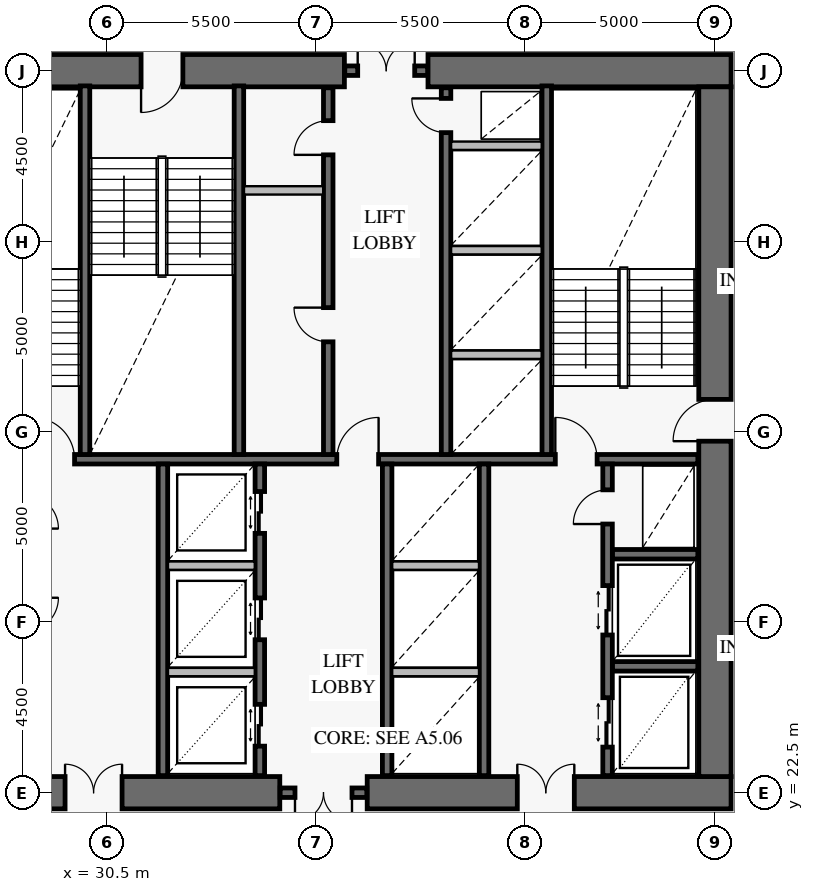
"""IFC4 building model, lengths in metres.
Left out: names, types, materials, properties, quantities, classifications, styles, units other than length and angle.
Written with IfcOpenShell. Run it as: python <this file> out.ifc"""

import sys

from ifc_helpers import new_model, si_unit, direction, frame, frame_2d, origin, place, context, subcontext, project, spatial, rectangle, extrude, element, fill, save


model = new_model("IFC4")
c1 = context("Model", 3, precision=1e-05, world=origin(), true_north=direction((0.0, 1.0)))
c2 = subcontext(c1, "Body", "Model", "MODEL_VIEW")
j1 = project(units=[si_unit("LENGTHUNIT", "METRE"), si_unit("PLANEANGLEUNIT", "RADIAN")], contexts=[c1])
p1 = place(None, origin())
s1 = spatial("IfcSite", under=j1, at=p1, CompositionType="ELEMENT")
p2 = place(p1, origin())
s2 = spatial("IfcBuilding", under=s1, at=p2, CompositionType="ELEMENT")
p3 = place(p2, frame((0.0, 0.0, 28.8)))
s3 = spatial("IfcBuildingStorey", under=s2, at=p3, CompositionType="ELEMENT", Elevation=28.8)
p4 = place(p3, frame((25.075, 22.5, 0.0), z_axis=(0.0, 0.0, 1.0), x_axis=(1.0, 0.0, 0.0)))
e1 = element("IfcWall", 1, at=p4, inside=s3, PredefinedType="SHEAR", context=c2, shape_type="SweptSolid", body=[
    extrude(rectangle(XDim=9.975, YDim=0.85, at=frame_2d((4.988, 0.0))), origin(), (0.0, 0.0, 1.0), 4.2),
])
p5 = place(p4, frame((4.325, 0.0, 0.0)))
e2 = element("IfcOpeningElement", 2, at=p5, cuts=e1, PredefinedType="OPENING", context=c2, shape_type="SweptSolid", body=[
    extrude(rectangle(XDim=1.5, YDim=2.15, at=frame_2d((0.75, 1.075))), frame((0.0, 0.437, 0.0), z_axis=(0.0, -1.0, 0.0), x_axis=(1.0, 0.0, 0.0)), (0.0, 0.0, 1.0), 0.874),
])
p6 = place(p3, frame((37.35, 22.5, 0.0), z_axis=(0.0, 0.0, 1.0), x_axis=(1.0, 0.0, 0.0)))
e3 = element("IfcWall", 3, at=p6, inside=s3, PredefinedType="SHEAR", context=c2, shape_type="SweptSolid", body=[
    extrude(rectangle(XDim=9.575, YDim=0.85, at=frame_2d((4.788, 0.0))), origin(), (0.0, 0.0, 1.0), 4.2),
])
p7 = place(p6, frame((3.95, 0.0, 0.0)))
e4 = element("IfcOpeningElement", 4, at=p7, cuts=e3, PredefinedType="OPENING", context=c2, shape_type="SweptSolid", body=[
    extrude(rectangle(XDim=1.5, YDim=2.15, at=frame_2d((0.75, 1.075))), frame((0.0, 0.437, 0.0), z_axis=(0.0, -1.0, 0.0), x_axis=(1.0, 0.0, 0.0)), (0.0, 0.0, 1.0), 0.874),
])
p8 = place(p3, frame((46.925, 41.5, 0.0), z_axis=(0.0, 0.0, 1.0), x_axis=(-1.0, 0.0, 0.0)))
e5 = element("IfcWall", 5, at=p8, inside=s3, PredefinedType="SHEAR", context=c2, shape_type="SweptSolid", body=[
    extrude(rectangle(XDim=7.975, YDim=0.85, at=frame_2d((3.988, 0.0))), origin(), (0.0, 0.0, 1.0), 4.2),
])
p9 = place(p3, frame((36.75, 41.5, 0.0), z_axis=(0.0, 0.0, 1.0), x_axis=(-1.0, 0.0, 0.0)))
e6 = element("IfcWall", 6, at=p9, inside=s3, PredefinedType="SHEAR", context=c2, shape_type="SweptSolid", body=[
    extrude(rectangle(XDim=11.675, YDim=0.85, at=frame_2d((5.837, 0.0))), origin(), (0.0, 0.0, 1.0), 4.2),
])
p10 = place(p9, frame((4.25, 0.0, 0.0)))
e7 = element("IfcOpeningElement", 7, at=p10, cuts=e6, PredefinedType="OPENING", context=c2, shape_type="SweptSolid", body=[
    extrude(rectangle(XDim=1.1, YDim=2.15, at=frame_2d((0.55, 1.075))), frame((0.0, 0.437, 0.0), z_axis=(0.0, -1.0, 0.0), x_axis=(1.0, 0.0, 0.0)), (0.0, 0.0, 1.0), 0.874),
])
p11 = place(p3, frame((46.5, 22.925, 0.0), z_axis=(0.0, 0.0, 1.0), x_axis=(0.0, 1.0, 0.0)))
e8 = element("IfcWall", 8, at=p11, inside=s3, PredefinedType="SHEAR", context=c2, shape_type="SweptSolid", body=[
    extrude(rectangle(XDim=18.15, YDim=0.85, at=frame_2d((9.075, 0.0))), origin(), (0.0, 0.0, 1.0), 4.2),
])
p12 = place(p11, frame((8.825, 0.0, 0.0)))
e9 = element("IfcOpeningElement", 9, at=p12, cuts=e8, PredefinedType="OPENING", context=c2, shape_type="SweptSolid", body=[
    extrude(rectangle(XDim=1.1, YDim=2.15, at=frame_2d((0.55, 1.075))), frame((0.0, 0.437, 0.0), z_axis=(0.0, -1.0, 0.0), x_axis=(1.0, 0.0, 0.0)), (0.0, 0.0, 1.0), 0.874),
])
p13 = place(p3, frame((35.06, 22.5, 0.0), z_axis=(0.0, 0.0, 1.0), x_axis=(1.0, 0.0, 0.0)))
e10 = element("IfcWall", 10, at=p13, inside=s3, PredefinedType="SOLIDWALL", context=c2, shape_type="SweptSolid", body=[
    extrude(rectangle(XDim=2.28, YDim=0.25, at=frame_2d((1.14, 0.0))), origin(), (0.0, 0.0, 1.0), 4.2),
])
p14 = place(p13, frame((0.39, 0.0, 0.0)))
e11 = element("IfcOpeningElement", 11, at=p14, cuts=e10, PredefinedType="OPENING", context=c2, shape_type="SweptSolid", body=[
    extrude(rectangle(XDim=1.5, YDim=2.15, at=frame_2d((0.75, 1.075))), frame((0.0, 0.137, 0.0), z_axis=(0.0, -1.0, 0.0), x_axis=(1.0, 0.0, 0.0)), (0.0, 0.0, 1.0), 0.274),
])
p15 = place(p3, frame((36.76, 41.5, 0.0), z_axis=(0.0, 0.0, 1.0), x_axis=(1.0, 0.0, 0.0)))
e12 = element("IfcWall", 12, at=p15, inside=s3, PredefinedType="SOLIDWALL", context=c2, shape_type="SweptSolid", body=[
    extrude(rectangle(XDim=2.18, YDim=0.25, at=frame_2d((1.09, 0.0))), origin(), (0.0, 0.0, 1.0), 4.2),
])
p16 = place(p15, frame((0.34, 0.0, 0.0)))
e13 = element("IfcOpeningElement", 13, at=p16, cuts=e12, PredefinedType="OPENING", context=c2, shape_type="SweptSolid", body=[
    extrude(rectangle(XDim=1.5, YDim=2.15, at=frame_2d((0.75, 1.075))), frame((0.0, 0.137, 0.0), z_axis=(0.0, -1.0, 0.0), x_axis=(1.0, 0.0, 0.0)), (0.0, 0.0, 1.0), 0.274),
])
p17 = place(p3, frame((25.95, 31.275, 0.0), z_axis=(0.0, 0.0, 1.0), x_axis=(1.0, 0.0, 0.0)))
e14 = element("IfcWall", 14, at=p17, inside=s3, PredefinedType="SOLIDWALL", context=c2, shape_type="SweptSolid", body=[
    extrude(rectangle(XDim=20.1, YDim=0.25, at=frame_2d((10.05, 0.0))), origin(), (0.0, 0.0, 1.0), 4.2),
])
p18 = place(p17, frame((2.6, 0.0, 0.0)))
e15 = element("IfcOpeningElement", 15, at=p18, cuts=e14, PredefinedType="OPENING", context=c2, shape_type="SweptSolid", body=[
    extrude(rectangle(XDim=1.1, YDim=2.15, at=frame_2d((0.55, 1.075))), frame((0.0, 0.137, 0.0), z_axis=(0.0, -1.0, 0.0), x_axis=(1.0, 0.0, 0.0)), (0.0, 0.0, 1.0), 0.274),
])
p19 = place(p17, frame((10.6, 0.0, 0.0)))
e16 = element("IfcOpeningElement", 16, at=p19, cuts=e14, PredefinedType="OPENING", context=c2, shape_type="SweptSolid", body=[
    extrude(rectangle(XDim=1.1, YDim=2.15, at=frame_2d((0.55, 1.075))), frame((0.0, 0.137, 0.0), z_axis=(0.0, -1.0, 0.0), x_axis=(1.0, 0.0, 0.0)), (0.0, 0.0, 1.0), 0.274),
])
p20 = place(p17, frame((16.35, 0.0, 0.0)))
e17 = element("IfcOpeningElement", 17, at=p20, cuts=e14, PredefinedType="OPENING", context=c2, shape_type="SweptSolid", body=[
    extrude(rectangle(XDim=1.1, YDim=2.15, at=frame_2d((0.55, 1.075))), frame((0.0, 0.137, 0.0), z_axis=(0.0, -1.0, 0.0), x_axis=(1.0, 0.0, 0.0)), (0.0, 0.0, 1.0), 0.274),
])
for number, where, z_axis, x_axis in (
    (18, (29.925, 31.4, 0.0), (0.0, 0.0, 1.0), (0.0, 1.0, 0.0)),
    (19, (33.975, 31.4, 0.0), (0.0, 0.0, 1.0), (0.0, 1.0, 0.0)),
    (20, (42.075, 31.4, 0.0), (0.0, 0.0, 1.0), (0.0, 1.0, 0.0)),
):
    element("IfcWall", number, at=place(p3, frame(where, z_axis=z_axis, x_axis=x_axis)), inside=s3, PredefinedType="SOLIDWALL", context=c2, shape_type="SweptSolid", body=[
        extrude(rectangle(XDim=9.7, YDim=0.25, at=frame_2d((4.85, 0.0))), origin(), (0.0, 0.0, 1.0), 4.2),
    ])
p21 = place(p3, frame((36.325, 31.4, 0.0), z_axis=(0.0, 0.0, 1.0), x_axis=(0.0, 1.0, 0.0)))
e21 = element("IfcWall", 21, at=p21, inside=s3, PredefinedType="SOLIDWALL", context=c2, shape_type="SweptSolid", body=[
    extrude(rectangle(XDim=9.65, YDim=0.25, at=frame_2d((4.825, 0.0))), origin(), (0.0, 0.0, 1.0), 4.2),
])
p22 = place(p21, frame((2.965, 0.0, 0.0)))
e22 = element("IfcOpeningElement", 22, at=p22, cuts=e21, PredefinedType="OPENING", context=c2, shape_type="SweptSolid", body=[
    extrude(rectangle(XDim=0.9, YDim=2.1, at=frame_2d((0.45, 1.05))), frame((0.0, 0.137, 0.0), z_axis=(0.0, -1.0, 0.0), x_axis=(1.0, 0.0, 0.0)), (0.0, 0.0, 1.0), 0.274),
])
p23 = place(p21, frame((7.885, 0.0, 0.0)))
e23 = element("IfcOpeningElement", 23, at=p23, cuts=e21, PredefinedType="OPENING", context=c2, shape_type="SweptSolid", body=[
    extrude(rectangle(XDim=0.9, YDim=2.1, at=frame_2d((0.45, 1.05))), frame((0.0, 0.137, 0.0), z_axis=(0.0, -1.0, 0.0), x_axis=(1.0, 0.0, 0.0)), (0.0, 0.0, 1.0), 0.274),
])
p24 = place(p3, frame((39.425, 31.4, 0.0), z_axis=(0.0, 0.0, 1.0), x_axis=(0.0, 1.0, 0.0)))
e24 = element("IfcWall", 24, at=p24, inside=s3, PredefinedType="SOLIDWALL", context=c2, shape_type="SweptSolid", body=[
    extrude(rectangle(XDim=9.65, YDim=0.25, at=frame_2d((4.825, 0.0))), origin(), (0.0, 0.0, 1.0), 4.2),
])
p25 = place(p24, frame((8.47, 0.0, 0.0)))
e25 = element("IfcOpeningElement", 25, at=p25, cuts=e24, PredefinedType="OPENING", context=c2, shape_type="SweptSolid", body=[
    extrude(rectangle(XDim=0.9, YDim=2.1, at=frame_2d((0.45, 1.05))), frame((0.0, 0.137, 0.0), z_axis=(0.0, -1.0, 0.0), x_axis=(1.0, 0.0, 0.0)), (0.0, 0.0, 1.0), 0.274),
])
p26 = place(p3, frame((31.975, 22.95, 0.0), z_axis=(0.0, 0.0, 1.0), x_axis=(0.0, 1.0, 0.0)))
e26 = element("IfcWall", 26, at=p26, inside=s3, PredefinedType="SOLIDWALL", context=c2, shape_type="SweptSolid", body=[
    extrude(rectangle(XDim=8.2, YDim=0.25, at=frame_2d((4.1, 0.0))), origin(), (0.0, 0.0, 1.0), 4.2),
])
p27 = place(p3, frame((34.525, 22.95, 0.0), z_axis=(0.0, 0.0, 1.0), x_axis=(0.0, 1.0, 0.0)))
e27 = element("IfcWall", 27, at=p27, inside=s3, PredefinedType="SOLIDWALL", context=c2, shape_type="SweptSolid", body=[
    extrude(rectangle(XDim=8.2, YDim=0.25, at=frame_2d((4.1, 0.0))), origin(), (0.0, 0.0, 1.0), 4.2),
])
p28 = place(p27, frame((0.775, 0.0, 0.0)))
e28 = element("IfcOpeningElement", 28, at=p28, cuts=e27, PredefinedType="OPENING", context=c2, shape_type="SweptSolid", body=[
    extrude(rectangle(XDim=1.1, YDim=2.2, at=frame_2d((0.55, 1.1))), frame((0.0, 0.137, 0.0), z_axis=(0.0, -1.0, 0.0), x_axis=(1.0, 0.0, 0.0)), (0.0, 0.0, 1.0), 0.274),
])
p29 = place(p27, frame((3.575, 0.0, 0.0)))
e29 = element("IfcOpeningElement", 29, at=p29, cuts=e27, PredefinedType="OPENING", context=c2, shape_type="SweptSolid", body=[
    extrude(rectangle(XDim=1.1, YDim=2.2, at=frame_2d((0.55, 1.1))), frame((0.0, 0.137, 0.0), z_axis=(0.0, -1.0, 0.0), x_axis=(1.0, 0.0, 0.0)), (0.0, 0.0, 1.0), 0.274),
])
p30 = place(p27, frame((6.375, 0.0, 0.0)))
e30 = element("IfcOpeningElement", 30, at=p30, cuts=e27, PredefinedType="OPENING", context=c2, shape_type="SweptSolid", body=[
    extrude(rectangle(XDim=1.1, YDim=2.2, at=frame_2d((0.55, 1.1))), frame((0.0, 0.137, 0.0), z_axis=(0.0, -1.0, 0.0), x_axis=(1.0, 0.0, 0.0)), (0.0, 0.0, 1.0), 0.274),
])
for number, where, z_axis, x_axis in (
    (31, (37.875, 22.95, 0.0), (0.0, 0.0, 1.0), (0.0, 1.0, 0.0)),
    (32, (40.425, 22.95, 0.0), (0.0, 0.0, 1.0), (0.0, 1.0, 0.0)),
):
    element("IfcWall", number, at=place(p3, frame(where, z_axis=z_axis, x_axis=x_axis)), inside=s3, PredefinedType="SOLIDWALL", context=c2, shape_type="SweptSolid", body=[
        extrude(rectangle(XDim=8.2, YDim=0.25, at=frame_2d((4.1, 0.0))), origin(), (0.0, 0.0, 1.0), 4.2),
    ])
for number, where, z_axis, x_axis in (
    (33, (43.8, 25.825, 0.0), (0.0, 0.0, 1.0), (1.0, 0.0, 0.0)),
    (34, (43.8, 28.775, 0.0), (0.0, 0.0, 1.0), (1.0, 0.0, 0.0)),
):
    element("IfcWall", number, at=place(p3, frame(where, z_axis=z_axis, x_axis=x_axis)), inside=s3, PredefinedType="SOLIDWALL", context=c2, shape_type="SweptSolid", body=[
        extrude(rectangle(XDim=2.25, YDim=0.25, at=frame_2d((1.125, 0.0))), origin(), (0.0, 0.0, 1.0), 4.2),
    ])
p31 = place(p3, frame((43.675, 22.95, 0.0), z_axis=(0.0, 0.0, 1.0), x_axis=(0.0, 1.0, 0.0)))
e35 = element("IfcWall", 35, at=p31, inside=s3, PredefinedType="SOLIDWALL", context=c2, shape_type="SweptSolid", body=[
    extrude(rectangle(XDim=8.2, YDim=0.25, at=frame_2d((4.1, 0.0))), origin(), (0.0, 0.0, 1.0), 4.2),
])
p32 = place(p31, frame((0.75, 0.0, 0.0)))
e36 = element("IfcOpeningElement", 36, at=p32, cuts=e35, PredefinedType="OPENING", context=c2, shape_type="SweptSolid", body=[
    extrude(rectangle(XDim=1.3, YDim=2.3, at=frame_2d((0.65, 1.15))), frame((0.0, 0.137, 0.0), z_axis=(0.0, -1.0, 0.0), x_axis=(1.0, 0.0, 0.0)), (0.0, 0.0, 1.0), 0.274),
])
p33 = place(p31, frame((3.7, 0.0, 0.0)))
e37 = element("IfcOpeningElement", 37, at=p33, cuts=e35, PredefinedType="OPENING", context=c2, shape_type="SweptSolid", body=[
    extrude(rectangle(XDim=1.3, YDim=2.3, at=frame_2d((0.65, 1.15))), frame((0.0, 0.137, 0.0), z_axis=(0.0, -1.0, 0.0), x_axis=(1.0, 0.0, 0.0)), (0.0, 0.0, 1.0), 0.274),
])
p34 = place(p31, frame((6.62, 0.0, 0.0)))
e38 = element("IfcOpeningElement", 38, at=p34, cuts=e35, PredefinedType="OPENING", context=c2, shape_type="SweptSolid", body=[
    extrude(rectangle(XDim=0.9, YDim=2.1, at=frame_2d((0.45, 1.05))), frame((0.0, 0.137, 0.0), z_axis=(0.0, -1.0, 0.0), x_axis=(1.0, 0.0, 0.0)), (0.0, 0.0, 1.0), 0.274),
])
p35 = place(p3, frame((34.108, 38.35, 0.0), z_axis=(0.0, 0.0, 1.0), x_axis=(1.0, 0.0, 0.0)))
e39 = element("IfcWall", 39, at=p35, inside=s3, PredefinedType="PARTITIONING", context=c2, shape_type="SweptSolid", body=[
    extrude(rectangle(XDim=2.084, YDim=0.22, at=frame_2d((1.042, 0.0))), origin(), (0.0, 0.0, 1.0), 3.92),
])
for number, where, z_axis, x_axis in (
    (40, (39.558, 34.025, 0.0), (0.0, 0.0, 1.0), (1.0, 0.0, 0.0)),
    (41, (39.558, 36.775, 0.0), (0.0, 0.0, 1.0), (1.0, 0.0, 0.0)),
    (42, (39.558, 39.525, 0.0), (0.0, 0.0, 1.0), (1.0, 0.0, 0.0)),
):
    element("IfcWall", number, at=place(p3, frame(where, z_axis=z_axis, x_axis=x_axis)), inside=s3, PredefinedType="PARTITIONING", context=c2, shape_type="SweptSolid", body=[
        extrude(rectangle(XDim=2.384, YDim=0.22, at=frame_2d((1.192, 0.0))), origin(), (0.0, 0.0, 1.0), 3.92),
    ])
for number, where, z_axis, x_axis in (
    (43, (32.108, 25.675, 0.0), (0.0, 0.0, 1.0), (1.0, 0.0, 0.0)),
    (44, (32.108, 28.475, 0.0), (0.0, 0.0, 1.0), (1.0, 0.0, 0.0)),
):
    element("IfcWall", number, at=place(p3, frame(where, z_axis=z_axis, x_axis=x_axis)), inside=s3, PredefinedType="PARTITIONING", context=c2, shape_type="SweptSolid", body=[
        extrude(rectangle(XDim=2.284, YDim=0.22, at=frame_2d((1.142, 0.0))), origin(), (0.0, 0.0, 1.0), 3.92),
    ])
for number, where, z_axis, x_axis in (
    (45, (38.008, 25.675, 0.0), (0.0, 0.0, 1.0), (1.0, 0.0, 0.0)),
    (46, (38.008, 28.475, 0.0), (0.0, 0.0, 1.0), (1.0, 0.0, 0.0)),
):
    element("IfcWall", number, at=place(p3, frame(where, z_axis=z_axis, x_axis=x_axis)), inside=s3, PredefinedType="PARTITIONING", context=c2, shape_type="SweptSolid", body=[
        extrude(rectangle(XDim=2.284, YDim=0.22, at=frame_2d((1.142, 0.0))), origin(), (0.0, 0.0, 1.0), 3.92),
    ])
p36 = place(p12, origin())
e47 = element("IfcDoor", 47, at=p36, inside=s3, OperationType="SINGLE_SWING_LEFT", PredefinedType="USERDEFINED", context=c2, shape_type="SweptSolid", body=[
    extrude(rectangle(XDim=1.1, YDim=2.15, at=frame_2d((0.55, 1.075))), frame((0.0, 0.025, 0.0), z_axis=(0.0, -1.0, 0.0), x_axis=(1.0, 0.0, 0.0)), (0.0, 0.0, 1.0), 0.05),
])
fill(e9, e47)
p37 = place(p10, origin())
e48 = element("IfcDoor", 48, at=p37, inside=s3, OperationType="SINGLE_SWING_RIGHT", PredefinedType="USERDEFINED", context=c2, shape_type="SweptSolid", body=[
    extrude(rectangle(XDim=1.1, YDim=2.15, at=frame_2d((0.55, 1.075))), frame((0.0, 0.025, 0.0), z_axis=(0.0, -1.0, 0.0), x_axis=(1.0, 0.0, 0.0)), (0.0, 0.0, 1.0), 0.05),
])
fill(e7, e48)
p38 = place(p5, origin())
e49 = element("IfcDoor", 49, at=p38, inside=s3, OperationType="DOUBLE_DOOR_SINGLE_SWING", PredefinedType="DOOR", context=c2, shape_type="SweptSolid", body=[
    extrude(rectangle(XDim=1.5, YDim=2.15, at=frame_2d((0.75, 1.075))), frame((0.0, 0.025, 0.0), z_axis=(0.0, -1.0, 0.0), x_axis=(1.0, 0.0, 0.0)), (0.0, 0.0, 1.0), 0.05),
])
fill(e2, e49)
p39 = place(p7, origin())
e50 = element("IfcDoor", 50, at=p39, inside=s3, OperationType="DOUBLE_DOOR_SINGLE_SWING", PredefinedType="DOOR", context=c2, shape_type="SweptSolid", body=[
    extrude(rectangle(XDim=1.5, YDim=2.15, at=frame_2d((0.75, 1.075))), frame((0.0, 0.025, 0.0), z_axis=(0.0, -1.0, 0.0), x_axis=(1.0, 0.0, 0.0)), (0.0, 0.0, 1.0), 0.05),
])
fill(e4, e50)
p40 = place(p14, frame((1.5, 0.0, 0.0), z_axis=(0.0, 0.0, 1.0), x_axis=(-1.0, 0.0, 0.0)))
e51 = element("IfcDoor", 51, at=p40, inside=s3, OperationType="DOUBLE_DOOR_SINGLE_SWING", PredefinedType="DOOR", context=c2, shape_type="SweptSolid", body=[
    extrude(rectangle(XDim=1.5, YDim=2.15, at=frame_2d((0.75, 1.075))), frame((0.0, 0.025, 0.0), z_axis=(0.0, -1.0, 0.0), x_axis=(1.0, 0.0, 0.0)), (0.0, 0.0, 1.0), 0.05),
])
fill(e11, e51)
p41 = place(p16, origin())
e52 = element("IfcDoor", 52, at=p41, inside=s3, OperationType="DOUBLE_DOOR_SINGLE_SWING", PredefinedType="DOOR", context=c2, shape_type="SweptSolid", body=[
    extrude(rectangle(XDim=1.5, YDim=2.15, at=frame_2d((0.75, 1.075))), frame((0.0, 0.025, 0.0), z_axis=(0.0, -1.0, 0.0), x_axis=(1.0, 0.0, 0.0)), (0.0, 0.0, 1.0), 0.05),
])
fill(e13, e52)
p42 = place(p18, origin())
e53 = element("IfcDoor", 53, at=p42, inside=s3, OperationType="SINGLE_SWING_LEFT", PredefinedType="USERDEFINED", context=c2, shape_type="SweptSolid", body=[
    extrude(rectangle(XDim=1.1, YDim=2.15, at=frame_2d((0.55, 1.075))), frame((0.0, 0.025, 0.0), z_axis=(0.0, -1.0, 0.0), x_axis=(1.0, 0.0, 0.0)), (0.0, 0.0, 1.0), 0.05),
])
fill(e15, e53)
p43 = place(p19, origin())
e54 = element("IfcDoor", 54, at=p43, inside=s3, OperationType="SINGLE_SWING_RIGHT", PredefinedType="USERDEFINED", context=c2, shape_type="SweptSolid", body=[
    extrude(rectangle(XDim=1.1, YDim=2.15, at=frame_2d((0.55, 1.075))), frame((0.0, 0.025, 0.0), z_axis=(0.0, -1.0, 0.0), x_axis=(1.0, 0.0, 0.0)), (0.0, 0.0, 1.0), 0.05),
])
fill(e16, e54)
p44 = place(p20, origin())
e55 = element("IfcDoor", 55, at=p44, inside=s3, OperationType="SINGLE_SWING_LEFT", PredefinedType="USERDEFINED", context=c2, shape_type="SweptSolid", body=[
    extrude(rectangle(XDim=1.1, YDim=2.15, at=frame_2d((0.55, 1.075))), frame((0.0, 0.025, 0.0), z_axis=(0.0, -1.0, 0.0), x_axis=(1.0, 0.0, 0.0)), (0.0, 0.0, 1.0), 0.05),
])
fill(e17, e55)
p45 = place(p22, origin())
e56 = element("IfcDoor", 56, at=p45, inside=s3, OperationType="SINGLE_SWING_RIGHT", PredefinedType="DOOR", context=c2, shape_type="SweptSolid", body=[
    extrude(rectangle(XDim=0.9, YDim=2.1, at=frame_2d((0.45, 1.05))), frame((0.0, 0.025, 0.0), z_axis=(0.0, -1.0, 0.0), x_axis=(1.0, 0.0, 0.0)), (0.0, 0.0, 1.0), 0.05),
])
fill(e22, e56)
p46 = place(p23, origin())
e57 = element("IfcDoor", 57, at=p46, inside=s3, OperationType="SINGLE_SWING_LEFT", PredefinedType="DOOR", context=c2, shape_type="SweptSolid", body=[
    extrude(rectangle(XDim=0.9, YDim=2.1, at=frame_2d((0.45, 1.05))), frame((0.0, 0.025, 0.0), z_axis=(0.0, -1.0, 0.0), x_axis=(1.0, 0.0, 0.0)), (0.0, 0.0, 1.0), 0.05),
])
fill(e23, e57)
p47 = place(p25, origin())
e58 = element("IfcDoor", 58, at=p47, inside=s3, OperationType="SINGLE_SWING_RIGHT", PredefinedType="DOOR", context=c2, shape_type="SweptSolid", body=[
    extrude(rectangle(XDim=0.9, YDim=2.1, at=frame_2d((0.45, 1.05))), frame((0.0, 0.025, 0.0), z_axis=(0.0, -1.0, 0.0), x_axis=(1.0, 0.0, 0.0)), (0.0, 0.0, 1.0), 0.05),
])
fill(e25, e58)
p48 = place(p28, frame((1.1, 0.0, 0.0), z_axis=(0.0, 0.0, 1.0), x_axis=(-1.0, 0.0, 0.0)))
e59 = element("IfcDoor", 59, at=p48, inside=s3, OperationType="DOUBLE_DOOR_SLIDING", PredefinedType="DOOR", context=c2, shape_type="SweptSolid", body=[
    extrude(rectangle(XDim=1.1, YDim=2.2, at=frame_2d((0.55, 1.1))), frame((0.0, 0.025, 0.0), z_axis=(0.0, -1.0, 0.0), x_axis=(1.0, 0.0, 0.0)), (0.0, 0.0, 1.0), 0.05),
])
fill(e28, e59)
p49 = place(p29, frame((1.1, 0.0, 0.0), z_axis=(0.0, 0.0, 1.0), x_axis=(-1.0, 0.0, 0.0)))
e60 = element("IfcDoor", 60, at=p49, inside=s3, OperationType="DOUBLE_DOOR_SLIDING", PredefinedType="DOOR", context=c2, shape_type="SweptSolid", body=[
    extrude(rectangle(XDim=1.1, YDim=2.2, at=frame_2d((0.55, 1.1))), frame((0.0, 0.025, 0.0), z_axis=(0.0, -1.0, 0.0), x_axis=(1.0, 0.0, 0.0)), (0.0, 0.0, 1.0), 0.05),
])
fill(e29, e60)
p50 = place(p30, frame((1.1, 0.0, 0.0), z_axis=(0.0, 0.0, 1.0), x_axis=(-1.0, 0.0, 0.0)))
e61 = element("IfcDoor", 61, at=p50, inside=s3, OperationType="DOUBLE_DOOR_SLIDING", PredefinedType="DOOR", context=c2, shape_type="SweptSolid", body=[
    extrude(rectangle(XDim=1.1, YDim=2.2, at=frame_2d((0.55, 1.1))), frame((0.0, 0.025, 0.0), z_axis=(0.0, -1.0, 0.0), x_axis=(1.0, 0.0, 0.0)), (0.0, 0.0, 1.0), 0.05),
])
fill(e30, e61)
p51 = place(p32, origin())
e62 = element("IfcDoor", 62, at=p51, inside=s3, OperationType="DOUBLE_DOOR_SLIDING", PredefinedType="DOOR", context=c2, shape_type="SweptSolid", body=[
    extrude(rectangle(XDim=1.3, YDim=2.3, at=frame_2d((0.65, 1.15))), frame((0.0, 0.025, 0.0), z_axis=(0.0, -1.0, 0.0), x_axis=(1.0, 0.0, 0.0)), (0.0, 0.0, 1.0), 0.05),
])
fill(e36, e62)
p52 = place(p33, origin())
e63 = element("IfcDoor", 63, at=p52, inside=s3, OperationType="DOUBLE_DOOR_SLIDING", PredefinedType="DOOR", context=c2, shape_type="SweptSolid", body=[
    extrude(rectangle(XDim=1.3, YDim=2.3, at=frame_2d((0.65, 1.15))), frame((0.0, 0.025, 0.0), z_axis=(0.0, -1.0, 0.0), x_axis=(1.0, 0.0, 0.0)), (0.0, 0.0, 1.0), 0.05),
])
fill(e37, e63)
p53 = place(p34, origin())
e64 = element("IfcDoor", 64, at=p53, inside=s3, OperationType="SINGLE_SWING_LEFT", PredefinedType="DOOR", context=c2, shape_type="SweptSolid", body=[
    extrude(rectangle(XDim=0.9, YDim=2.1, at=frame_2d((0.45, 1.05))), frame((0.0, 0.025, 0.0), z_axis=(0.0, -1.0, 0.0), x_axis=(1.0, 0.0, 0.0)), (0.0, 0.0, 1.0), 0.05),
])
fill(e38, e64)
save(model, sys.argv[1])
